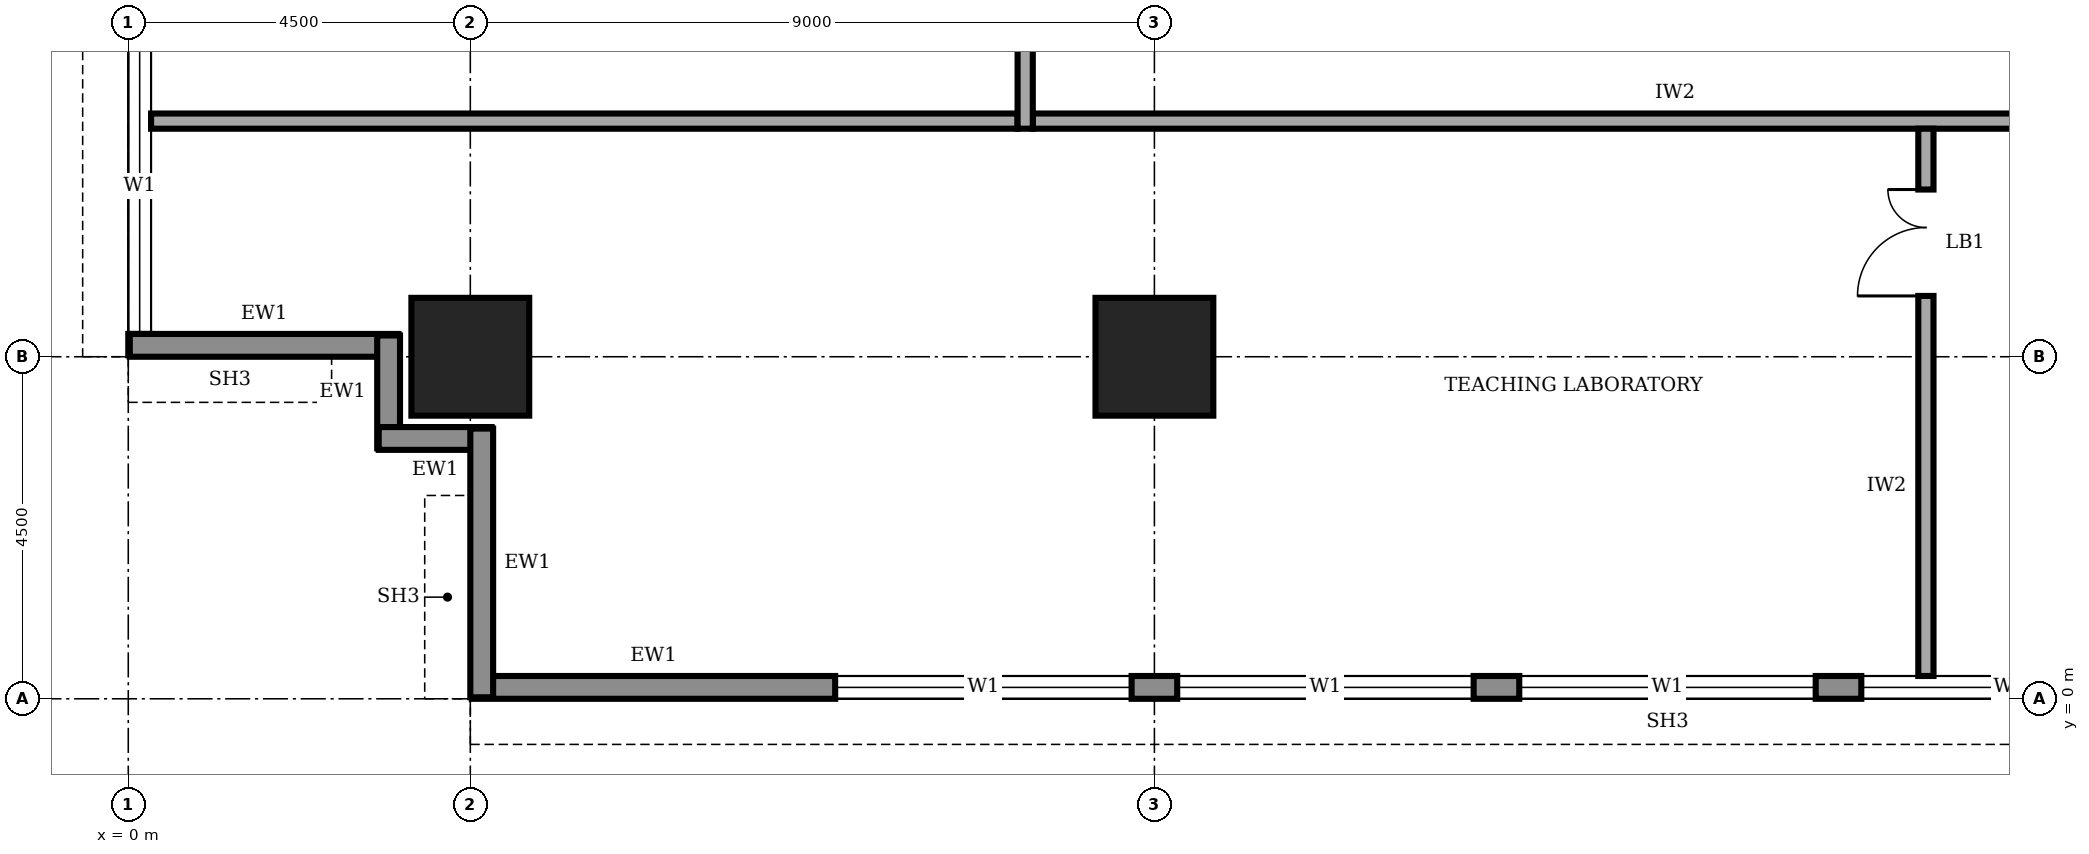
"""IFC4 building model, lengths in metres.
Left out: names, types, materials, properties, quantities, classifications, styles, units other than length and angle.
Written with IfcOpenShell. Run it as: python <this file> out.ifc"""

import sys

from ifc_helpers import new_model, si_unit, direction, frame, frame_2d, origin, origin_2d, place, context, subcontext, project, spatial, rectangle, extrude, element, fill, save


model = new_model("IFC4")
c1 = context("Model", 3, precision=1e-05, world=origin(), true_north=direction((0.0, 1.0)))
c2 = subcontext(c1, "Body", "Model", "MODEL_VIEW")
j1 = project(units=[si_unit("LENGTHUNIT", "METRE"), si_unit("PLANEANGLEUNIT", "RADIAN")], contexts=[c1])
p1 = place(None, origin())
s1 = spatial("IfcSite", under=j1, at=p1, CompositionType="ELEMENT")
p2 = place(p1, origin())
s2 = spatial("IfcBuilding", under=s1, at=p2, CompositionType="ELEMENT")
p3 = place(p2, frame((0.0, 0.0, 213.0)))
s3 = spatial("IfcBuildingStorey", under=s2, at=p3, CompositionType="ELEMENT", Elevation=213.0)
for number, where, z_axis, x_axis in (
    (1, (4.5, 4.5, 0.0), (0.0, 0.0, 1.0), (1.0, 0.0, 0.0)),
    (2, (13.5, 4.5, 0.0), (0.0, 0.0, 1.0), (1.0, 0.0, 0.0)),
):
    element("IfcColumn", number, at=place(p3, frame(where, z_axis=z_axis, x_axis=x_axis)), inside=s3, PredefinedType="COLUMN", context=c2, shape_type="SweptSolid", body=[
        extrude(rectangle(XDim=1.55, YDim=1.55, at=origin_2d()), origin(), (0.0, 0.0, 1.0), 4.0),
    ])
p4 = place(p3, frame((4.52, 0.15, 0.0), z_axis=(0.0, 0.0, 1.0), x_axis=(1.0, 0.0, 0.0)))
e3 = element("IfcWall", 3, at=p4, inside=s3, PredefinedType="STANDARD", context=c2, shape_type="SweptSolid", body=[
    extrude(rectangle(XDim=31.46, YDim=0.3, at=frame_2d((15.73, 0.0))), origin(), (0.0, 0.0, 1.0), 3.75),
])
p5 = place(p4, frame((4.78, 0.0, 0.9)))
e4 = element("IfcOpeningElement", 4, at=p5, cuts=e3, PredefinedType="OPENING", context=c2, shape_type="SweptSolid", body=[
    extrude(rectangle(XDim=3.9, YDim=2.2, at=frame_2d((1.95, 1.1))), frame((0.0, 0.16, 0.0), z_axis=(0.0, -1.0, 0.0), x_axis=(1.0, 0.0, 0.0)), (0.0, 0.0, 1.0), 0.32),
])
p6 = place(p4, frame((9.28, 0.0, 0.9)))
e5 = element("IfcOpeningElement", 5, at=p6, cuts=e3, PredefinedType="OPENING", context=c2, shape_type="SweptSolid", body=[
    extrude(rectangle(XDim=3.9, YDim=2.2, at=frame_2d((1.95, 1.1))), frame((0.0, 0.16, 0.0), z_axis=(0.0, -1.0, 0.0), x_axis=(1.0, 0.0, 0.0)), (0.0, 0.0, 1.0), 0.32),
])
p7 = place(p4, frame((13.78, 0.0, 0.9)))
e6 = element("IfcOpeningElement", 6, at=p7, cuts=e3, PredefinedType="OPENING", context=c2, shape_type="SweptSolid", body=[
    extrude(rectangle(XDim=3.9, YDim=2.2, at=frame_2d((1.95, 1.1))), frame((0.0, 0.16, 0.0), z_axis=(0.0, -1.0, 0.0), x_axis=(1.0, 0.0, 0.0)), (0.0, 0.0, 1.0), 0.32),
])
p8 = place(p4, frame((18.28, 0.0, 0.9)))
e7 = element("IfcOpeningElement", 7, at=p8, cuts=e3, PredefinedType="OPENING", context=c2, shape_type="SweptSolid", body=[
    extrude(rectangle(XDim=3.9, YDim=2.2, at=frame_2d((1.95, 1.1))), frame((0.0, 0.16, 0.0), z_axis=(0.0, -1.0, 0.0), x_axis=(1.0, 0.0, 0.0)), (0.0, 0.0, 1.0), 0.32),
])
p9 = place(p4, frame((22.78, 0.0, 0.9)))
e8 = element("IfcOpeningElement", 8, at=p9, cuts=e3, PredefinedType="OPENING", context=c2, shape_type="SweptSolid", body=[
    extrude(rectangle(XDim=3.9, YDim=2.2, at=frame_2d((1.95, 1.1))), frame((0.0, 0.16, 0.0), z_axis=(0.0, -1.0, 0.0), x_axis=(1.0, 0.0, 0.0)), (0.0, 0.0, 1.0), 0.32),
])
p10 = place(p4, frame((27.28, 0.0, 0.9)))
e9 = element("IfcOpeningElement", 9, at=p10, cuts=e3, PredefinedType="OPENING", context=c2, shape_type="SweptSolid", body=[
    extrude(rectangle(XDim=3.9, YDim=2.2, at=frame_2d((1.95, 1.1))), frame((0.0, 0.16, 0.0), z_axis=(0.0, -1.0, 0.0), x_axis=(1.0, 0.0, 0.0)), (0.0, 0.0, 1.0), 0.32),
])
p11 = place(p3, frame((0.15, 35.98, 0.0), z_axis=(0.0, 0.0, 1.0), x_axis=(0.0, -1.0, 0.0)))
e10 = element("IfcWall", 10, at=p11, inside=s3, PredefinedType="STANDARD", context=c2, shape_type="SweptSolid", body=[
    extrude(rectangle(XDim=31.46, YDim=0.3, at=frame_2d((15.73, 0.0))), origin(), (0.0, 0.0, 1.0), 3.75),
])
p12 = place(p11, frame((27.28, 0.0, 0.9)))
e11 = element("IfcOpeningElement", 11, at=p12, cuts=e10, PredefinedType="OPENING", context=c2, shape_type="SweptSolid", body=[
    extrude(rectangle(XDim=3.9, YDim=2.2, at=frame_2d((1.95, 1.1))), frame((0.0, 0.16, 0.0), z_axis=(0.0, -1.0, 0.0), x_axis=(1.0, 0.0, 0.0)), (0.0, 0.0, 1.0), 0.32),
])
p13 = place(p11, frame((22.78, 0.0, 0.9)))
e12 = element("IfcOpeningElement", 12, at=p13, cuts=e10, PredefinedType="OPENING", context=c2, shape_type="SweptSolid", body=[
    extrude(rectangle(XDim=3.9, YDim=2.2, at=frame_2d((1.95, 1.1))), frame((0.0, 0.16, 0.0), z_axis=(0.0, -1.0, 0.0), x_axis=(1.0, 0.0, 0.0)), (0.0, 0.0, 1.0), 0.32),
])
p14 = place(p11, frame((18.28, 0.0, 0.9)))
e13 = element("IfcOpeningElement", 13, at=p14, cuts=e10, PredefinedType="OPENING", context=c2, shape_type="SweptSolid", body=[
    extrude(rectangle(XDim=3.9, YDim=2.2, at=frame_2d((1.95, 1.1))), frame((0.0, 0.16, 0.0), z_axis=(0.0, -1.0, 0.0), x_axis=(1.0, 0.0, 0.0)), (0.0, 0.0, 1.0), 0.32),
])
p15 = place(p11, frame((13.78, 0.0, 0.9)))
e14 = element("IfcOpeningElement", 14, at=p15, cuts=e10, PredefinedType="OPENING", context=c2, shape_type="SweptSolid", body=[
    extrude(rectangle(XDim=3.9, YDim=2.2, at=frame_2d((1.95, 1.1))), frame((0.0, 0.16, 0.0), z_axis=(0.0, -1.0, 0.0), x_axis=(1.0, 0.0, 0.0)), (0.0, 0.0, 1.0), 0.32),
])
p16 = place(p11, frame((9.28, 0.0, 0.9)))
e15 = element("IfcOpeningElement", 15, at=p16, cuts=e10, PredefinedType="OPENING", context=c2, shape_type="SweptSolid", body=[
    extrude(rectangle(XDim=3.9, YDim=2.2, at=frame_2d((1.95, 1.1))), frame((0.0, 0.16, 0.0), z_axis=(0.0, -1.0, 0.0), x_axis=(1.0, 0.0, 0.0)), (0.0, 0.0, 1.0), 0.32),
])
p17 = place(p11, frame((4.78, 0.0, 0.9)))
e16 = element("IfcOpeningElement", 16, at=p17, cuts=e10, PredefinedType="OPENING", context=c2, shape_type="SweptSolid", body=[
    extrude(rectangle(XDim=3.9, YDim=2.2, at=frame_2d((1.95, 1.1))), frame((0.0, 0.16, 0.0), z_axis=(0.0, -1.0, 0.0), x_axis=(1.0, 0.0, 0.0)), (0.0, 0.0, 1.0), 0.32),
])
p18 = place(p3, frame((0.02, 4.65, 0.0), z_axis=(0.0, 0.0, 1.0), x_axis=(1.0, 0.0, 0.0)))
e17 = element("IfcWall", 17, at=p18, inside=s3, PredefinedType="STANDARD", context=c2, shape_type="SweptSolid", body=[
    extrude(rectangle(XDim=3.535, YDim=0.3, at=frame_2d((1.768, 0.0))), origin(), (0.0, 0.0, 1.0), 2.85),
])
for number, where, z_axis, x_axis in (
    (18, (3.425, 4.78, 0.0), (0.0, 0.0, 1.0), (0.0, -1.0, 0.0)),
    (19, (3.295, 3.425, 0.0), (0.0, 0.0, 1.0), (1.0, 0.0, 0.0)),
):
    element("IfcWall", number, at=place(p3, frame(where, z_axis=z_axis, x_axis=x_axis)), inside=s3, PredefinedType="STANDARD", context=c2, shape_type="SweptSolid", body=[
        extrude(rectangle(XDim=1.485, YDim=0.3, at=frame_2d((0.743, 0.0))), origin(), (0.0, 0.0, 1.0), 3.75),
    ])
p19 = place(p3, frame((4.65, 3.555, 0.0), z_axis=(0.0, 0.0, 1.0), x_axis=(0.0, -1.0, 0.0)))
e20 = element("IfcWall", 20, at=p19, inside=s3, PredefinedType="STANDARD", context=c2, shape_type="SweptSolid", body=[
    extrude(rectangle(XDim=3.535, YDim=0.3, at=frame_2d((1.768, 0.0))), origin(), (0.0, 0.0, 1.0), 2.85),
])
p20 = place(p3, frame((11.9, 7.6, 0.0), z_axis=(0.0, 0.0, 1.0), x_axis=(1.0, 0.0, 0.0)))
e21 = element("IfcWall", 21, at=p20, inside=s3, PredefinedType="SOLIDWALL", context=c2, shape_type="SweptSolid", body=[
    extrude(rectangle(XDim=16.9, YDim=0.2, at=frame_2d((8.45, 0.0))), origin(), (0.0, 0.0, 1.0), 3.75),
])
p21 = place(p3, frame((11.8, 31.3, 0.0), z_axis=(0.0, 0.0, 1.0), x_axis=(0.0, -1.0, 0.0)))
e22 = element("IfcWall", 22, at=p21, inside=s3, PredefinedType="SOLIDWALL", context=c2, shape_type="SweptSolid", body=[
    extrude(rectangle(XDim=23.8, YDim=0.2, at=frame_2d((11.9, 0.0))), origin(), (0.0, 0.0, 1.0), 3.75),
])
p22 = place(p21, frame((20.3, 0.0, 0.0)))
e23 = element("IfcOpeningElement", 23, at=p22, cuts=e22, PredefinedType="OPENING", context=c2, shape_type="SweptSolid", body=[
    extrude(rectangle(XDim=1.0, YDim=2.1, at=frame_2d((0.5, 1.05))), frame((0.0, 0.11, 0.0), z_axis=(0.0, -1.0, 0.0), x_axis=(1.0, 0.0, 0.0)), (0.0, 0.0, 1.0), 0.22),
])
p23 = place(p21, frame((16.15, 0.0, 0.0)))
e24 = element("IfcOpeningElement", 24, at=p23, cuts=e22, PredefinedType="OPENING", context=c2, shape_type="SweptSolid", body=[
    extrude(rectangle(XDim=0.9, YDim=2.1, at=frame_2d((0.45, 1.05))), frame((0.0, 0.11, 0.0), z_axis=(0.0, -1.0, 0.0), x_axis=(1.0, 0.0, 0.0)), (0.0, 0.0, 1.0), 0.22),
])
p24 = place(p21, frame((12.95, 0.0, 0.0)))
e25 = element("IfcOpeningElement", 25, at=p24, cuts=e22, PredefinedType="OPENING", context=c2, shape_type="SweptSolid", body=[
    extrude(rectangle(XDim=0.9, YDim=2.1, at=frame_2d((0.45, 1.05))), frame((0.0, 0.11, 0.0), z_axis=(0.0, -1.0, 0.0), x_axis=(1.0, 0.0, 0.0)), (0.0, 0.0, 1.0), 0.22),
])
p25 = place(p21, frame((7.4, 0.0, 0.0)))
e26 = element("IfcOpeningElement", 26, at=p25, cuts=e22, PredefinedType="OPENING", context=c2, shape_type="SweptSolid", body=[
    extrude(rectangle(XDim=0.9, YDim=2.1, at=frame_2d((0.45, 1.05))), frame((0.0, 0.11, 0.0), z_axis=(0.0, -1.0, 0.0), x_axis=(1.0, 0.0, 0.0)), (0.0, 0.0, 1.0), 0.22),
])
p26 = place(p21, frame((4.8, 0.0, 0.0)))
e27 = element("IfcOpeningElement", 27, at=p26, cuts=e22, PredefinedType="OPENING", context=c2, shape_type="SweptSolid", body=[
    extrude(rectangle(XDim=1.0, YDim=2.1, at=frame_2d((0.5, 1.05))), frame((0.0, 0.11, 0.0), z_axis=(0.0, -1.0, 0.0), x_axis=(1.0, 0.0, 0.0)), (0.0, 0.0, 1.0), 0.22),
])
p27 = place(p21, frame((9.9, 0.0, 0.0)))
e28 = element("IfcOpeningElement", 28, at=p27, cuts=e22, PredefinedType="OPENING", context=c2, shape_type="SweptSolid", body=[
    extrude(rectangle(XDim=1.0, YDim=2.1, at=frame_2d((0.5, 1.05))), frame((0.0, 0.11, 0.0), z_axis=(0.0, -1.0, 0.0), x_axis=(1.0, 0.0, 0.0)), (0.0, 0.0, 1.0), 0.22),
])
p28 = place(p21, frame((1.55, 0.0, 0.0)))
e29 = element("IfcOpeningElement", 29, at=p28, cuts=e22, PredefinedType="OPENING", context=c2, shape_type="SweptSolid", body=[
    extrude(rectangle(XDim=1.0, YDim=2.1, at=frame_2d((0.5, 1.05))), frame((0.0, 0.11, 0.0), z_axis=(0.0, -1.0, 0.0), x_axis=(1.0, 0.0, 0.0)), (0.0, 0.0, 1.0), 0.22),
])
p29 = place(p3, frame((23.65, 0.3, 0.0), z_axis=(0.0, 0.0, 1.0), x_axis=(0.0, 1.0, 0.0)))
e30 = element("IfcWall", 30, at=p29, inside=s3, PredefinedType="SOLIDWALL", context=c2, shape_type="SweptSolid", body=[
    extrude(rectangle(XDim=7.2, YDim=0.2, at=frame_2d((3.6, 0.0))), origin(), (0.0, 0.0, 1.0), 3.75),
])
p30 = place(p29, frame((5.0, 0.0, 0.0)))
e31 = element("IfcOpeningElement", 31, at=p30, cuts=e30, PredefinedType="OPENING", context=c2, shape_type="SweptSolid", body=[
    extrude(rectangle(XDim=1.4, YDim=2.1, at=frame_2d((0.7, 1.05))), frame((0.0, 0.11, 0.0), z_axis=(0.0, -1.0, 0.0), x_axis=(1.0, 0.0, 0.0)), (0.0, 0.0, 1.0), 0.22),
])
p31 = place(p3, frame((0.3, 7.6, 0.0), z_axis=(0.0, 0.0, 1.0), x_axis=(1.0, 0.0, 0.0)))
e32 = element("IfcWall", 32, at=p31, inside=s3, PredefinedType="SOLIDWALL", context=c2, shape_type="SweptSolid", body=[
    extrude(rectangle(XDim=11.4, YDim=0.2, at=frame_2d((5.7, 0.0))), origin(), (0.0, 0.0, 1.0), 3.75),
])
p32 = place(p5, origin())
e33 = element("IfcWindow", 33, at=p32, inside=s3, PartitioningType="SINGLE_PANEL", PredefinedType="WINDOW", context=c2, shape_type="SweptSolid", body=[
    extrude(rectangle(XDim=3.9, YDim=2.2, at=frame_2d((1.95, 1.1))), frame((0.0, 0.03, 0.0), z_axis=(0.0, -1.0, 0.0), x_axis=(1.0, 0.0, 0.0)), (0.0, 0.0, 1.0), 0.06),
])
fill(e4, e33)
p33 = place(p6, origin())
e34 = element("IfcWindow", 34, at=p33, inside=s3, PartitioningType="SINGLE_PANEL", PredefinedType="WINDOW", context=c2, shape_type="SweptSolid", body=[
    extrude(rectangle(XDim=3.9, YDim=2.2, at=frame_2d((1.95, 1.1))), frame((0.0, 0.03, 0.0), z_axis=(0.0, -1.0, 0.0), x_axis=(1.0, 0.0, 0.0)), (0.0, 0.0, 1.0), 0.06),
])
fill(e5, e34)
p34 = place(p7, origin())
e35 = element("IfcWindow", 35, at=p34, inside=s3, PartitioningType="SINGLE_PANEL", PredefinedType="WINDOW", context=c2, shape_type="SweptSolid", body=[
    extrude(rectangle(XDim=3.9, YDim=2.2, at=frame_2d((1.95, 1.1))), frame((0.0, 0.03, 0.0), z_axis=(0.0, -1.0, 0.0), x_axis=(1.0, 0.0, 0.0)), (0.0, 0.0, 1.0), 0.06),
])
fill(e6, e35)
p35 = place(p8, origin())
e36 = element("IfcWindow", 36, at=p35, inside=s3, PartitioningType="SINGLE_PANEL", PredefinedType="WINDOW", context=c2, shape_type="SweptSolid", body=[
    extrude(rectangle(XDim=3.9, YDim=2.2, at=frame_2d((1.95, 1.1))), frame((0.0, 0.03, 0.0), z_axis=(0.0, -1.0, 0.0), x_axis=(1.0, 0.0, 0.0)), (0.0, 0.0, 1.0), 0.06),
])
fill(e7, e36)
p36 = place(p12, origin())
e37 = element("IfcWindow", 37, at=p36, inside=s3, PartitioningType="SINGLE_PANEL", PredefinedType="WINDOW", context=c2, shape_type="SweptSolid", body=[
    extrude(rectangle(XDim=3.9, YDim=2.2, at=frame_2d((1.95, 1.1))), frame((0.0, 0.03, 0.0), z_axis=(0.0, -1.0, 0.0), x_axis=(1.0, 0.0, 0.0)), (0.0, 0.0, 1.0), 0.06),
])
fill(e11, e37)
p37 = place(p30, origin())
e38 = element("IfcDoor", 38, at=p37, inside=s3, OperationType="DOUBLE_DOOR_SINGLE_SWING", PredefinedType="DOOR", context=c2, shape_type="SweptSolid", body=[
    extrude(rectangle(XDim=1.4, YDim=2.1, at=frame_2d((0.7, 1.05))), frame((0.0, 0.025, 0.0), z_axis=(0.0, -1.0, 0.0), x_axis=(1.0, 0.0, 0.0)), (0.0, 0.0, 1.0), 0.05),
])
fill(e31, e38)
save(model, sys.argv[1])
